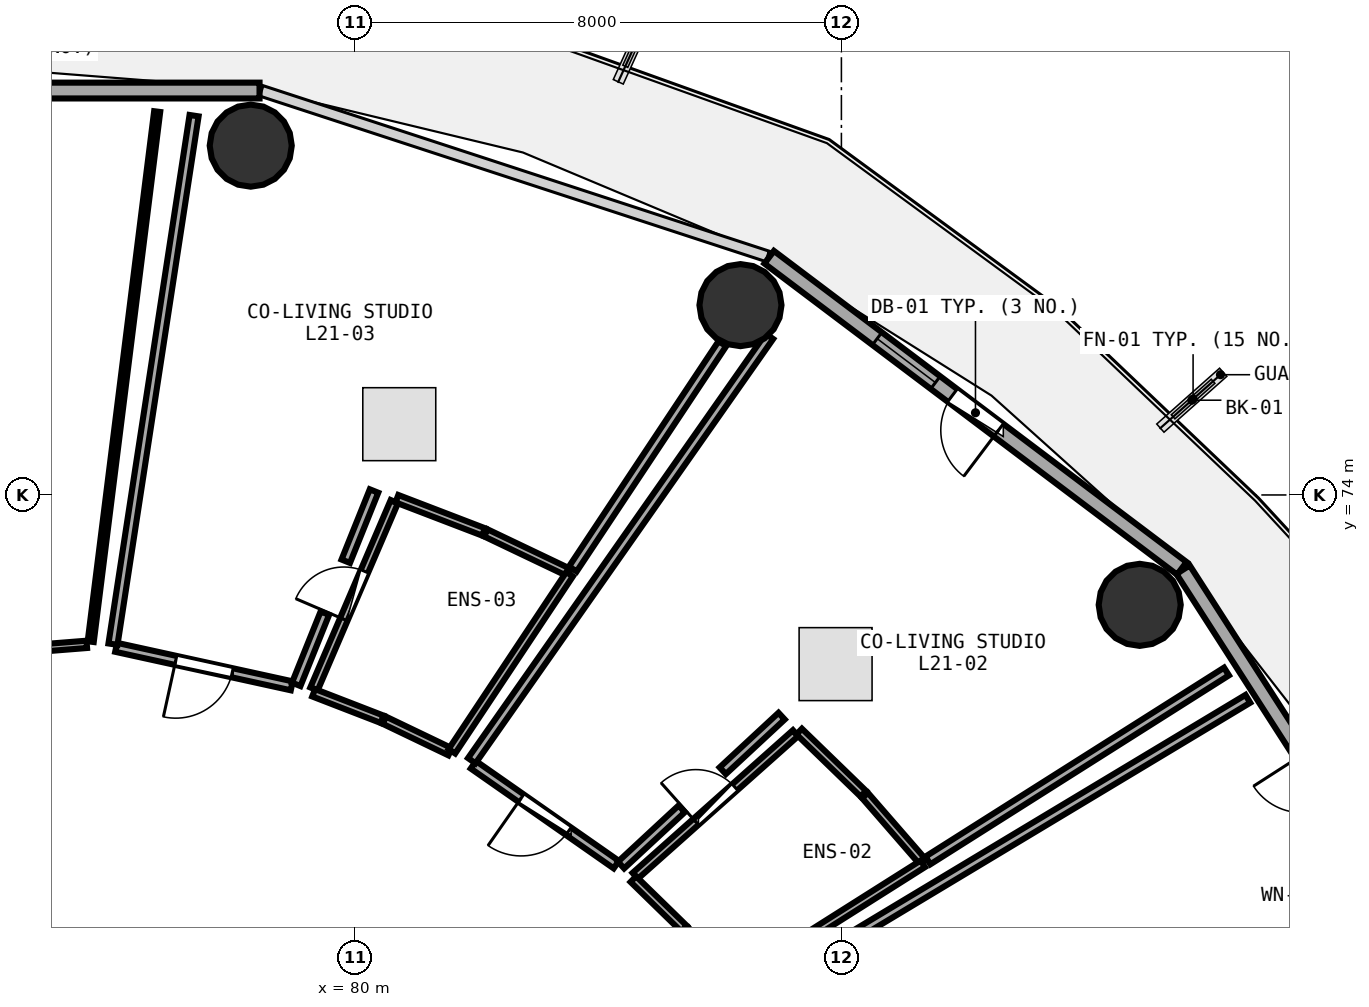
"""IFC4 building model, lengths in metres.
Left out: names, types, materials, properties, quantities, classifications, styles, units other than length and angle.
Written with IfcOpenShell. Run it as: python <this file> out.ifc"""

import sys

from ifc_helpers import new_model, si_unit, direction, frame, frame_2d, origin, origin_2d, place, context, subcontext, project, spatial, rectangle, circle, extrude, element, fill, save


model = new_model("IFC4")
c1 = context("Model", 3, precision=1e-05, world=origin(), true_north=direction((0.0, 1.0)))
c2 = subcontext(c1, "Body", "Model", "MODEL_VIEW")
j1 = project(units=[si_unit("LENGTHUNIT", "METRE"), si_unit("PLANEANGLEUNIT", "RADIAN")], contexts=[c1])
p1 = place(None, origin())
s1 = spatial("IfcSite", under=j1, at=p1, CompositionType="ELEMENT")
p2 = place(p1, origin())
s2 = spatial("IfcBuilding", under=s1, at=p2, CompositionType="ELEMENT")
p3 = place(p2, frame((0.0, 0.0, 83.85)))
s3 = spatial("IfcBuildingStorey", under=s2, at=p3, CompositionType="ELEMENT", Elevation=83.85)
for number, where, z_axis, x_axis in (
    (1, (92.906, 72.193, 0.0), (0.0, 0.0, 1.0), (1.0, 0.0, 0.0)),
    (2, (86.34, 77.122, 0.0), (0.0, 0.0, 1.0), (1.0, 0.0, 0.0)),
    (3, (78.286, 79.745, 0.0), (0.0, 0.0, 1.0), (1.0, 0.0, 0.0)),
):
    element("IfcColumn", number, at=place(p3, frame(where, z_axis=z_axis, x_axis=x_axis)), inside=s3, PredefinedType="COLUMN", context=c2, shape_type="SweptSolid", body=[
        extrude(circle(Radius=0.675, at=origin_2d()), origin(), (0.0, 0.0, 1.0), 3.75),
    ])
p4 = place(p3, frame((98.048, 65.879, 0.0), z_axis=(0.0, 0.0, 1.0), x_axis=(-0.540620528459, 0.841266571432, 0.0)))
e4 = element("IfcWall", 4, at=p4, inside=s3, PredefinedType="SOLIDWALL", context=c2, shape_type="SweptSolid", body=[
    extrude(rectangle(XDim=8.193, YDim=0.26, at=frame_2d((4.096, 0.0))), origin(), (0.0, 0.0, 1.0), 3.475),
])
p5 = place(p4, frame((3.621, 0.0, 0.0)))
e5 = element("IfcOpeningElement", 5, at=p5, cuts=e4, PredefinedType="OPENING", context=c2, shape_type="SweptSolid", body=[
    extrude(rectangle(XDim=0.95, YDim=2.1, at=frame_2d((0.475, 1.05))), frame((0.0, 0.14, 0.0), z_axis=(0.0, -1.0, 0.0), x_axis=(1.0, 0.0, 0.0)), (0.0, 0.0, 1.0), 0.28),
])
p6 = place(p4, frame((2.041, 0.0, 0.85)))
e6 = element("IfcOpeningElement", 6, at=p6, cuts=e4, PredefinedType="OPENING", context=c2, shape_type="SweptSolid", body=[
    extrude(rectangle(XDim=1.2, YDim=1.45, at=frame_2d((0.6, 0.725))), frame((0.0, 0.14, 0.0), z_axis=(0.0, -1.0, 0.0), x_axis=(1.0, 0.0, 0.0)), (0.0, 0.0, 1.0), 0.28),
])
p7 = place(p3, frame((93.599, 72.793, 0.0), z_axis=(0.0, 0.0, 1.0), x_axis=(-0.798501507879, 0.601992808857, 0.0)))
e7 = element("IfcWall", 7, at=p7, inside=s3, PredefinedType="SOLIDWALL", context=c2, shape_type="SweptSolid", body=[
    extrude(rectangle(XDim=8.499, YDim=0.26, at=frame_2d((4.25, 0.0))), origin(), (0.0, 0.0, 1.0), 3.475),
])
p8 = place(p7, frame((3.775, 0.0, 0.0)))
e8 = element("IfcOpeningElement", 8, at=p8, cuts=e7, PredefinedType="OPENING", context=c2, shape_type="SweptSolid", body=[
    extrude(rectangle(XDim=0.95, YDim=2.1, at=frame_2d((0.475, 1.05))), frame((0.0, 0.14, 0.0), z_axis=(0.0, -1.0, 0.0), x_axis=(1.0, 0.0, 0.0)), (0.0, 0.0, 1.0), 0.28),
])
p9 = place(p7, frame((5.075, 0.0, 0.85)))
e9 = element("IfcOpeningElement", 9, at=p9, cuts=e7, PredefinedType="OPENING", context=c2, shape_type="SweptSolid", body=[
    extrude(rectangle(XDim=1.2, YDim=1.45, at=frame_2d((0.6, 0.725))), frame((0.0, 0.14, 0.0), z_axis=(0.0, -1.0, 0.0), x_axis=(1.0, 0.0, 0.0)), (0.0, 0.0, 1.0), 0.28),
])
p10 = place(p3, frame((78.43, 80.651, 0.0), z_axis=(0.0, 0.0, 1.0), x_axis=(-1.0, 0.0, 0.0)))
e10 = element("IfcWall", 10, at=p10, inside=s3, PredefinedType="SOLIDWALL", context=c2, shape_type="SweptSolid", body=[
    extrude(rectangle(XDim=8.861, YDim=0.26, at=frame_2d((4.43, 0.0))), origin(), (0.0, 0.0, 1.0), 3.475),
])
p11 = place(p10, frame((3.63, 0.0, 0.85)))
e11 = element("IfcOpeningElement", 11, at=p11, cuts=e10, PredefinedType="OPENING", context=c2, shape_type="SweptSolid", body=[
    extrude(rectangle(XDim=1.6, YDim=1.45, at=frame_2d((0.8, 0.725))), frame((0.0, 0.14, 0.0), z_axis=(0.0, -1.0, 0.0), x_axis=(1.0, 0.0, 0.0)), (0.0, 0.0, 1.0), 0.28),
])
p12 = place(p3, frame((84.609, 67.736, 0.0), z_axis=(0.0, 0.0, 1.0), x_axis=(0.746989483068, 0.664835853565, 0.0)))
e12 = element("IfcWall", 12, at=p12, inside=s3, PredefinedType="PLUMBINGWALL", context=c2, shape_type="SweptSolid", body=[
    extrude(rectangle(XDim=3.531, YDim=0.13, at=frame_2d((1.765, 0.0))), origin(), (0.0, 0.0, 1.0), 3.175),
])
p13 = place(p12, frame((1.335, 0.0, 0.0)))
e13 = element("IfcOpeningElement", 13, at=p13, cuts=e12, PredefinedType="OPENING", context=c2, shape_type="SweptSolid", body=[
    extrude(rectangle(XDim=0.86, YDim=2.05, at=frame_2d((0.43, 1.025))), frame((0.0, 0.075, 0.0), z_axis=(0.0, -1.0, 0.0), x_axis=(1.0, 0.0, 0.0)), (0.0, 0.0, 1.0), 0.15),
])
p14 = place(p3, frame((84.298, 67.92, 0.0), z_axis=(0.0, 0.0, 1.0), x_axis=(-0.819775565256, 0.572684924378, 0.0)))
e14 = element("IfcWall", 14, at=p14, inside=s3, PredefinedType="PARTITIONING", context=c2, shape_type="SweptSolid", body=[
    extrude(rectangle(XDim=2.867, YDim=0.15, at=frame_2d((1.434, 0.0))), origin(), (0.0, 0.0, 1.0), 2.925),
])
p15 = place(p14, frame((0.959, 0.0, 0.0)))
e15 = element("IfcOpeningElement", 15, at=p15, cuts=e14, PredefinedType="OPENING", context=c2, shape_type="SweptSolid", body=[
    extrude(rectangle(XDim=0.95, YDim=2.08, at=frame_2d((0.475, 1.04))), frame((0.0, 0.085, 0.0), z_axis=(0.0, -1.0, 0.0), x_axis=(1.0, 0.0, 0.0)), (0.0, 0.0, 1.0), 0.17),
])
p16 = place(p3, frame((79.326, 70.809, 0.0), z_axis=(0.0, 0.0, 1.0), x_axis=(0.394174106006, 0.919035785024, 0.0)))
e16 = element("IfcWall", 16, at=p16, inside=s3, PredefinedType="PLUMBINGWALL", context=c2, shape_type="SweptSolid", body=[
    extrude(rectangle(XDim=3.353, YDim=0.13, at=frame_2d((1.677, 0.0))), origin(), (0.0, 0.0, 1.0), 2.925),
])
p17 = place(p16, frame((1.247, 0.0, 0.0)))
e17 = element("IfcOpeningElement", 17, at=p17, cuts=e16, PredefinedType="OPENING", context=c2, shape_type="SweptSolid", body=[
    extrude(rectangle(XDim=0.86, YDim=2.05, at=frame_2d((0.43, 1.025))), frame((0.0, 0.075, 0.0), z_axis=(0.0, -1.0, 0.0), x_axis=(1.0, 0.0, 0.0)), (0.0, 0.0, 1.0), 0.15),
])
p18 = place(p3, frame((78.96, 70.861, 0.0), z_axis=(0.0, 0.0, 1.0), x_axis=(-0.976789452363, 0.214201694093, 0.0)))
e18 = element("IfcWall", 18, at=p18, inside=s3, PredefinedType="PARTITIONING", context=c2, shape_type="SweptSolid", body=[
    extrude(rectangle(XDim=2.957, YDim=0.15, at=frame_2d((1.478, 0.0))), origin(), (0.0, 0.0, 1.0), 3.48),
])
p19 = place(p18, frame((1.003, 0.0, 0.0)))
e19 = element("IfcOpeningElement", 19, at=p19, cuts=e18, PredefinedType="OPENING", context=c2, shape_type="SweptSolid", body=[
    extrude(rectangle(XDim=0.95, YDim=2.08, at=frame_2d((0.475, 1.04))), frame((0.0, 0.085, 0.0), z_axis=(0.0, -1.0, 0.0), x_axis=(1.0, 0.0, 0.0)), (0.0, 0.0, 1.0), 0.17),
])
p20 = place(p3, frame((75.589, 71.543, 0.0), z_axis=(0.0, 0.0, 1.0), x_axis=(-0.996863165686, -0.079144354814, 0.0)))
e20 = element("IfcWall", 20, at=p20, inside=s3, PredefinedType="PARTITIONING", context=c2, shape_type="SweptSolid", body=[
    extrude(rectangle(XDim=5.765, YDim=0.12, at=frame_2d((2.883, 0.0))), origin(), (0.0, 0.0, 1.0), 2.925),
])
p21 = place(p20, frame((2.433, 0.0, 0.0)))
e21 = element("IfcOpeningElement", 21, at=p21, cuts=e20, PredefinedType="OPENING", context=c2, shape_type="SweptSolid", body=[
    extrude(rectangle(XDim=0.9, YDim=2.08, at=frame_2d((0.45, 1.04))), frame((0.0, 0.07, 0.0), z_axis=(0.0, -1.0, 0.0), x_axis=(1.0, 0.0, 0.0)), (0.0, 0.0, 1.0), 0.14),
])
p22 = place(p3, frame((86.45, 65.702, 0.0), z_axis=(0.0, 0.0, 1.0), x_axis=(0.857261851198, 0.514880683731, 0.0)))
e22 = element("IfcWall", 22, at=p22, inside=s3, PredefinedType="PARTITIONING", context=c2, shape_type="SweptSolid", body=[
    extrude(rectangle(XDim=9.606, YDim=0.15, at=frame_2d((4.803, 0.0))), origin(), (0.0, 0.0, 1.0), 2.975),
])
p23 = place(p3, frame((85.411, 66.87, 0.0), z_axis=(0.0, 0.0, 1.0), x_axis=(-0.715871547002, 0.698232001696, 0.0)))
e23 = element("IfcWall", 23, at=p23, inside=s3, PredefinedType="PLUMBINGWALL", context=c2, shape_type="SweptSolid", body=[
    extrude(rectangle(XDim=1.163, YDim=0.13, at=frame_2d((0.581, 0.0))), origin(), (0.0, 0.0, 1.0), 2.925),
])
p24 = place(p3, frame((87.305, 70.109, 0.0), z_axis=(0.0, 0.0, 1.0), x_axis=(0.718235032224, -0.69580057379, 0.0)))
e24 = element("IfcWall", 24, at=p24, inside=s3, PredefinedType="PLUMBINGWALL", context=c2, shape_type="SweptSolid", body=[
    extrude(rectangle(XDim=1.469, YDim=0.13, at=frame_2d((0.735, 0.0))), origin(), (0.0, 0.0, 1.0), 2.925),
])
p25 = place(p3, frame((88.388, 69.058, 0.0), z_axis=(0.0, 0.0, 1.0), x_axis=(0.656315808405, -0.754486288568, 0.0)))
e25 = element("IfcWall", 25, at=p25, inside=s3, PredefinedType="PLUMBINGWALL", context=c2, shape_type="SweptSolid", body=[
    extrude(rectangle(XDim=1.455, YDim=0.13, at=frame_2d((0.728, 0.0))), origin(), (0.0, 0.0, 1.0), 2.925),
])
p26 = place(p3, frame((89.339, 67.934, 0.0), z_axis=(0.0, 0.0, 1.0), x_axis=(-0.845293712827, -0.53430191751, 0.0)))
e26 = element("IfcWall", 26, at=p26, inside=s3, PredefinedType="PLUMBINGWALL", context=c2, shape_type="SweptSolid", body=[
    extrude(rectangle(XDim=3.687, YDim=0.13, at=frame_2d((1.843, 0.0))), origin(), (0.0, 0.0, 1.0), 3.175),
])
p27 = place(p3, frame((81.921, 69.63, 0.0), z_axis=(0.0, 0.0, 1.0), x_axis=(0.574246298275, 0.818682593511, 0.0)))
e27 = element("IfcWall", 27, at=p27, inside=s3, PredefinedType="PARTITIONING", context=c2, shape_type="SweptSolid", body=[
    extrude(rectangle(XDim=8.525, YDim=0.15, at=frame_2d((4.262, 0.0))), origin(), (0.0, 0.0, 1.0), 2.925),
])
p28 = place(p3, frame((94.333, 71.097, 0.0), z_axis=(0.0, 0.0, 1.0), x_axis=(-0.845032344767, -0.534715191759, 0.0)))
e28 = element("IfcWall", 28, at=p28, inside=s3, PredefinedType="PARTITIONING", context=c2, shape_type="SweptSolid", body=[
    extrude(rectangle(XDim=5.811, YDim=0.15, at=frame_2d((2.905, 0.0))), origin(), (0.0, 0.0, 1.0), 2.975),
])
p29 = place(p3, frame((87.017, 70.363, 0.0), z_axis=(0.0, 0.0, 1.0), x_axis=(-0.733142432265, -0.680075123801, 0.0)))
e29 = element("IfcWall", 29, at=p29, inside=s3, PredefinedType="PARTITIONING", context=c2, shape_type="SweptSolid", body=[
    extrude(rectangle(XDim=1.32, YDim=0.15, at=frame_2d((0.66, 0.0))), origin(), (0.0, 0.0, 1.0), 3.175),
])
p30 = place(p3, frame((85.374, 68.839, 0.0), z_axis=(0.0, 0.0, 1.0), x_axis=(-0.733068131904, -0.680155213159, 0.0)))
e30 = element("IfcWall", 30, at=p30, inside=s3, PredefinedType="PARTITIONING", context=c2, shape_type="SweptSolid", body=[
    extrude(rectangle(XDim=1.361, YDim=0.15, at=frame_2d((0.681, 0.0))), origin(), (0.0, 0.0, 1.0), 3.235),
])
p31 = place(p3, frame((81.565, 69.777, 0.0), z_axis=(0.0, 0.0, 1.0), x_axis=(-0.901710288712, 0.432340785991, 0.0)))
e31 = element("IfcWall", 31, at=p31, inside=s3, PredefinedType="PLUMBINGWALL", context=c2, shape_type="SweptSolid", body=[
    extrude(rectangle(XDim=1.2, YDim=0.13, at=frame_2d((0.6, 0.0))), origin(), (0.0, 0.0, 1.0), 2.925),
])
p32 = place(p3, frame((80.446, 70.311, 0.0), z_axis=(0.0, 0.0, 1.0), x_axis=(-0.932603244632, 0.360903294669, 0.0)))
e32 = element("IfcWall", 32, at=p32, inside=s3, PredefinedType="PLUMBINGWALL", context=c2, shape_type="SweptSolid", body=[
    extrude(rectangle(XDim=1.207, YDim=0.13, at=frame_2d((0.604, 0.0))), origin(), (0.0, 0.0, 1.0), 3.235),
])
p33 = place(p3, frame((80.69, 73.939, 0.0), z_axis=(0.0, 0.0, 1.0), x_axis=(0.933707809738, -0.358035928413, 0.0)))
e33 = element("IfcWall", 33, at=p33, inside=s3, PredefinedType="PLUMBINGWALL", context=c2, shape_type="SweptSolid", body=[
    extrude(rectangle(XDim=1.527, YDim=0.13, at=frame_2d((0.763, 0.0))), origin(), (0.0, 0.0, 1.0), 3.48),
])
p34 = place(p3, frame((82.152, 73.376, 0.0), z_axis=(0.0, 0.0, 1.0), x_axis=(0.902598876691, -0.430482598714, 0.0)))
e34 = element("IfcWall", 34, at=p34, inside=s3, PredefinedType="PLUMBINGWALL", context=c2, shape_type="SweptSolid", body=[
    extrude(rectangle(XDim=1.519, YDim=0.13, at=frame_2d((0.759, 0.0))), origin(), (0.0, 0.0, 1.0), 3.175),
])
p35 = place(p3, frame((83.53, 72.697, 0.0), z_axis=(0.0, 0.0, 1.0), x_axis=(-0.553523611894, -0.832833483402, 0.0)))
e35 = element("IfcWall", 35, at=p35, inside=s3, PredefinedType="PLUMBINGWALL", context=c2, shape_type="SweptSolid", body=[
    extrude(rectangle(XDim=3.497, YDim=0.13, at=frame_2d((1.749, 0.0))), origin(), (0.0, 0.0, 1.0), 3.175),
])
p36 = place(p3, frame((76.02, 71.546, 0.0), z_axis=(0.0, 0.0, 1.0), x_axis=(0.151710828081, 0.988424921096, 0.0)))
e36 = element("IfcWall", 36, at=p36, inside=s3, PredefinedType="PARTITIONING", context=c2, shape_type="SweptSolid", body=[
    extrude(rectangle(XDim=8.793, YDim=0.15, at=frame_2d((4.396, 0.0))), origin(), (0.0, 0.0, 1.0), 2.975),
])
p37 = place(p3, frame((86.043, 76.488, 0.0), z_axis=(0.0, 0.0, 1.0), x_axis=(-0.553014365691, -0.833171717799, 0.0)))
e37 = element("IfcWall", 37, at=p37, inside=s3, PredefinedType="PARTITIONING", context=c2, shape_type="SweptSolid", body=[
    extrude(rectangle(XDim=4.448, YDim=0.15, at=frame_2d((2.224, 0.0))), origin(), (0.0, 0.0, 1.0), 2.925),
])
p38 = place(p3, frame((80.313, 74.065, 0.0), z_axis=(0.0, 0.0, 1.0), x_axis=(-0.373249856729, -0.927730857766, 0.0)))
e38 = element("IfcWall", 38, at=p38, inside=s3, PredefinedType="PARTITIONING", context=c2, shape_type="SweptSolid", body=[
    extrude(rectangle(XDim=1.245, YDim=0.15, at=frame_2d((0.622, 0.0))), origin(), (0.0, 0.0, 1.0), 2.925),
])
p39 = place(p3, frame((79.505, 72.056, 0.0), z_axis=(0.0, 0.0, 1.0), x_axis=(-0.373190252803, -0.927754835726, 0.0)))
e39 = element("IfcWall", 39, at=p39, inside=s3, PredefinedType="PARTITIONING", context=c2, shape_type="SweptSolid", body=[
    extrude(rectangle(XDim=1.263, YDim=0.15, at=frame_2d((0.631, 0.0))), origin(), (0.0, 0.0, 1.0), 3.48),
])
p40 = place(p3, frame((76.747, 80.304, 0.0), z_axis=(0.0, 0.0, 1.0), x_axis=(-0.124421236745, -0.992229487491, 0.0)))
e40 = element("IfcWall", 40, at=p40, inside=s3, PredefinedType="PARTITIONING", context=c2, shape_type="SweptSolid", body=[
    extrude(rectangle(XDim=8.785, YDim=0.1, at=frame_2d((4.393, 0.0))), origin(), (0.0, 0.0, 1.0), 2.975),
])
p41 = place(p8, frame((0.95, 0.0, 0.0), z_axis=(0.0, 0.0, 1.0), x_axis=(-1.0, 0.0, 0.0)))
e41 = element("IfcDoor", 41, at=p41, inside=s3, OperationType="SINGLE_SWING_RIGHT", PredefinedType="DOOR", context=c2, shape_type="SweptSolid", body=[
    extrude(rectangle(XDim=0.95, YDim=2.1, at=frame_2d((0.475, 1.05))), frame((0.0, 0.025, 0.0), z_axis=(0.0, -1.0, 0.0), x_axis=(1.0, 0.0, 0.0)), (0.0, 0.0, 1.0), 0.05),
])
fill(e8, e41)
p42 = place(p9, origin())
e42 = element("IfcWindow", 42, at=p42, inside=s3, PartitioningType="SINGLE_PANEL", PredefinedType="WINDOW", context=c2, shape_type="SweptSolid", body=[
    extrude(rectangle(XDim=1.2, YDim=1.45, at=frame_2d((0.6, 0.725))), frame((0.0, 0.03, 0.0), z_axis=(0.0, -1.0, 0.0), x_axis=(1.0, 0.0, 0.0)), (0.0, 0.0, 1.0), 0.06),
])
fill(e9, e42)
p43 = place(p13, origin())
e43 = element("IfcDoor", 43, at=p43, inside=s3, OperationType="SINGLE_SWING_LEFT", PredefinedType="DOOR", context=c2, shape_type="SweptSolid", body=[
    extrude(rectangle(XDim=0.86, YDim=2.05, at=frame_2d((0.43, 1.025))), frame((0.0, 0.025, 0.0), z_axis=(0.0, -1.0, 0.0), x_axis=(1.0, 0.0, 0.0)), (0.0, 0.0, 1.0), 0.05),
])
fill(e13, e43)
p44 = place(p15, origin())
e44 = element("IfcDoor", 44, at=p44, inside=s3, OperationType="SINGLE_SWING_RIGHT", PredefinedType="DOOR", context=c2, shape_type="SweptSolid", body=[
    extrude(rectangle(XDim=0.95, YDim=2.08, at=frame_2d((0.475, 1.04))), frame((0.0, 0.025, 0.0), z_axis=(0.0, -1.0, 0.0), x_axis=(1.0, 0.0, 0.0)), (0.0, 0.0, 1.0), 0.05),
])
fill(e15, e44)
p45 = place(p17, origin())
e45 = element("IfcDoor", 45, at=p45, inside=s3, OperationType="SINGLE_SWING_LEFT", PredefinedType="DOOR", context=c2, shape_type="SweptSolid", body=[
    extrude(rectangle(XDim=0.86, YDim=2.05, at=frame_2d((0.43, 1.025))), frame((0.0, 0.025, 0.0), z_axis=(0.0, -1.0, 0.0), x_axis=(1.0, 0.0, 0.0)), (0.0, 0.0, 1.0), 0.05),
])
fill(e17, e45)
p46 = place(p19, origin())
e46 = element("IfcDoor", 46, at=p46, inside=s3, OperationType="SINGLE_SWING_RIGHT", PredefinedType="DOOR", context=c2, shape_type="SweptSolid", body=[
    extrude(rectangle(XDim=0.95, YDim=2.08, at=frame_2d((0.475, 1.04))), frame((0.0, 0.025, 0.0), z_axis=(0.0, -1.0, 0.0), x_axis=(1.0, 0.0, 0.0)), (0.0, 0.0, 1.0), 0.05),
])
fill(e19, e46)
save(model, sys.argv[1])
